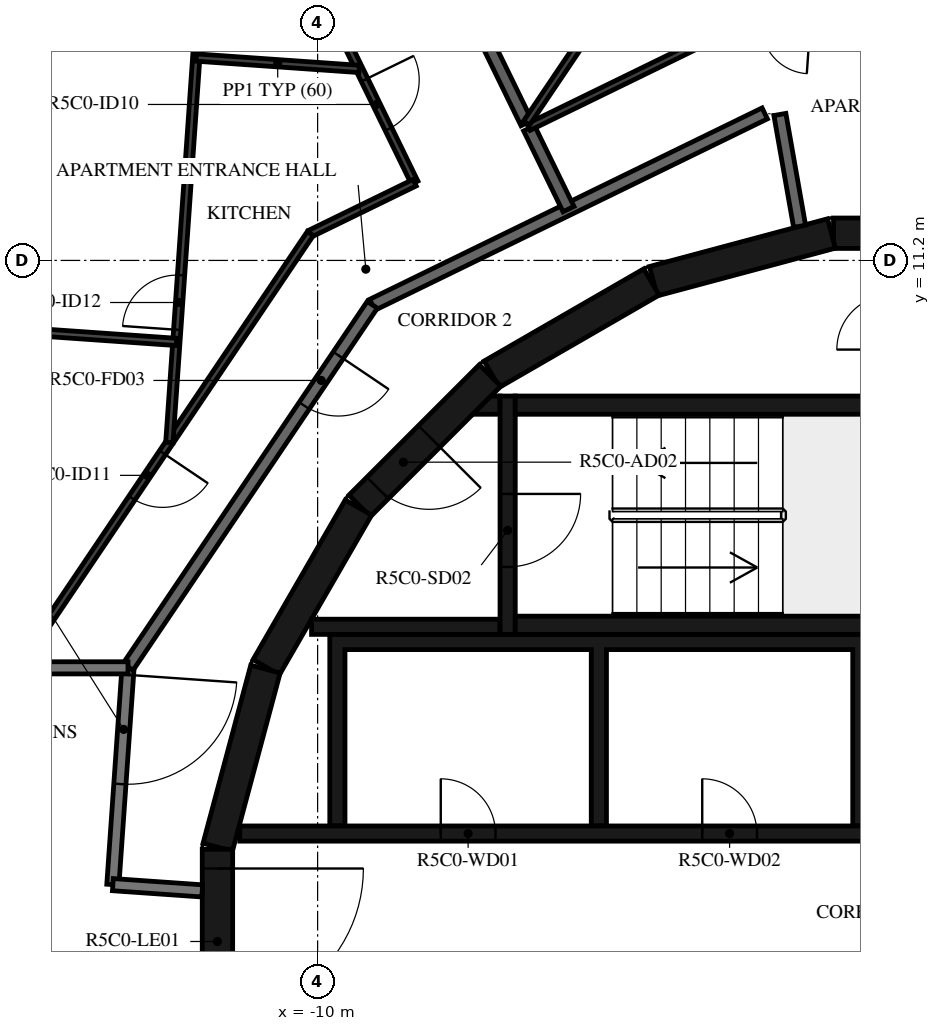
"""IFC4 building model, lengths in metres.
Left out: names, types, materials, properties, quantities, classifications, styles, units other than length and angle.
Written with IfcOpenShell. Run it as: python <this file> out.ifc"""

import sys

from ifc_helpers import new_model, si_unit, direction, frame, frame_2d, origin, place, context, subcontext, project, spatial, polyline, rectangle, outline, extrude, element, fill, save


model = new_model("IFC4")
c1 = context("Model", 3, precision=1e-05, world=origin(), true_north=direction((0.0, 1.0)))
c2 = subcontext(c1, "Body", "Model", "MODEL_VIEW")
j1 = project(units=[si_unit("LENGTHUNIT", "METRE"), si_unit("PLANEANGLEUNIT", "RADIAN")], contexts=[c1])
p1 = place(None, origin())
s1 = spatial("IfcSite", under=j1, at=p1, CompositionType="ELEMENT")
p2 = place(p1, origin())
s2 = spatial("IfcBuilding", under=s1, at=p2, CompositionType="ELEMENT")
p3 = place(p2, frame((0.0, 0.0, 209.4)))
s3 = spatial("IfcBuildingStorey", under=s2, at=p3, CompositionType="ELEMENT", Elevation=209.4)
for number, where, z_axis, x_axis in (
    (1, (1.516, 11.647, 0.0), (0.0, 0.0, 1.0), (-1.0, 0.0, 0.0)),
    (2, (-1.55, 11.643, 0.0), (0.0, 0.0, 1.0), (-0.966, -0.259, 0.0)),
    (3, (-4.51, 10.845, 0.0), (0.0, 0.0, 1.0), (-0.866, -0.5, 0.0)),
):
    element("IfcWall", number, at=place(p3, frame(where, z_axis=z_axis, x_axis=x_axis)), inside=s3, PredefinedType="SHEAR", context=c2, shape_type="SweptSolid", body=[
        extrude(rectangle(XDim=3.033, YDim=0.5, at=frame_2d((1.516, 0.0))), origin(), (0.0, 0.0, 1.0), 3.12),
    ])
p4 = place(p3, frame((-7.164, 9.308, 0.0), z_axis=(0.0, 0.0, 1.0), x_axis=(-0.707106781187, -0.707106781187, 0.0)))
e4 = element("IfcWall", 4, at=p4, inside=s3, PredefinedType="SHEAR", context=c2, shape_type="SweptSolid", body=[
    extrude(rectangle(XDim=3.032, YDim=0.5, at=frame_2d((1.516, 0.0))), origin(), (0.0, 0.0, 1.0), 3.12),
])
p5 = place(p4, frame((1.416, 0.0, 0.0)))
e5 = element("IfcOpeningElement", 5, at=p5, cuts=e4, PredefinedType="OPENING", context=c2, shape_type="SweptSolid", body=[
    extrude(rectangle(XDim=1.2, YDim=2.1, at=frame_2d((0.6, 1.05))), frame((0.0, 0.26, 0.0), z_axis=(0.0, -1.0, 0.0), x_axis=(1.0, 0.0, 0.0)), (0.0, 0.0, 1.0), 0.52),
])
for number, where, z_axis, x_axis in (
    (6, (-9.329, 7.137, 0.0), (0.0, 0.0, 1.0), (-0.5, -0.866, 0.0)),
    (7, (-10.858, 4.479, 0.0), (0.0, 0.0, 1.0), (-0.259, -0.966, 0.0)),
):
    element("IfcWall", number, at=place(p3, frame(where, z_axis=z_axis, x_axis=x_axis)), inside=s3, PredefinedType="SHEAR", context=c2, shape_type="SweptSolid", body=[
        extrude(rectangle(XDim=3.033, YDim=0.5, at=frame_2d((1.516, 0.0))), origin(), (0.0, 0.0, 1.0), 3.12),
    ])
p6 = place(p3, frame((-11.647, 1.516, 0.0), z_axis=(0.0, 0.0, 1.0), x_axis=(0.0, -1.0, 0.0)))
e8 = element("IfcWall", 8, at=p6, inside=s3, PredefinedType="SHEAR", context=c2, shape_type="SweptSolid", body=[
    extrude(rectangle(XDim=3.033, YDim=0.5, at=frame_2d((1.516, 0.0))), origin(), (0.0, 0.0, 1.0), 3.12),
])
p7 = place(p6, frame((0.316, 0.0, 0.0)))
e9 = element("IfcOpeningElement", 9, at=p7, cuts=e8, PredefinedType="OPENING", context=c2, shape_type="SweptSolid", body=[
    extrude(rectangle(XDim=2.4, YDim=2.1, at=frame_2d((1.2, 1.05))), frame((0.0, 0.26, 0.0), z_axis=(0.0, -1.0, 0.0), x_axis=(1.0, 0.0, 0.0)), (0.0, 0.0, 1.0), 0.52),
])
for number, where, z_axis, x_axis in (
    (10, (-6.75, 5.2, 0.0), (0.0, 0.0, 1.0), (1.0, 0.0, 0.0)),
    (11, (-6.75, 8.82, 0.0), (0.0, 0.0, 1.0), (1.0, 0.0, 0.0)),
):
    element("IfcWall", number, at=place(p3, frame(where, z_axis=z_axis, x_axis=x_axis)), inside=s3, PredefinedType="SHEAR", context=c2, shape_type="SweptSolid", body=[
        extrude(rectangle(XDim=6.75, YDim=0.3, at=frame_2d((3.375, 0.0))), origin(), (0.0, 0.0, 1.0), 3.12),
    ])
p8 = place(p3, frame((-6.875, 8.97, 0.0), z_axis=(0.0, 0.0, 1.0), x_axis=(0.0, -1.0, 0.0)))
e12 = element("IfcWall", 12, at=p8, inside=s3, PredefinedType="SHEAR", context=c2, shape_type="SweptSolid", body=[
    extrude(rectangle(XDim=3.92, YDim=0.25, at=frame_2d((1.96, 0.0))), origin(), (0.0, 0.0, 1.0), 3.12),
])
p9 = place(p8, frame((1.61, 0.0, 0.0)))
e13 = element("IfcOpeningElement", 13, at=p9, cuts=e12, PredefinedType="OPENING", context=c2, shape_type="SweptSolid", body=[
    extrude(rectangle(XDim=1.2, YDim=2.1, at=frame_2d((0.6, 1.05))), frame((0.0, 0.135, 0.0), z_axis=(0.0, -1.0, 0.0), x_axis=(1.0, 0.0, 0.0)), (0.0, 0.0, 1.0), 0.27),
])
p10 = place(p3, frame((-7.0, 5.175, 0.0), z_axis=(0.0, 0.0, 1.0), x_axis=(-1.0, 0.0, 0.0)))
e14 = element("IfcWall", 14, at=p10, inside=s3, PredefinedType="SHEAR", context=c2, shape_type="SweptSolid", body=[
    extrude(rectangle(XDim=3.1, YDim=0.25, at=frame_2d((1.55, 0.0))), origin(), (0.0, 0.0, 1.0), 3.12),
])
p11 = place(p3, origin())
e15 = element("IfcWall", 15, at=p11, inside=s3, PredefinedType="SHEAR", context=c2, shape_type="SweptSolid", body=[
    extrude(outline(polyline([(-7.148, 8.97), (-7.0, 8.97), (-7.0, 8.67), (-7.448, 8.67), (-7.148, 8.97)])), origin(), (0.0, 0.0, 1.0), 3.12),
])
p12 = place(p3, origin())
e16 = element("IfcWall", 16, at=p12, inside=s3, PredefinedType="SHEAR", context=c2, shape_type="SweptSolid", body=[
    extrude(outline(polyline([(-9.55, 4.8), (-5.5, 4.8), (-5.5, 1.9), (-5.25, 1.9), (-5.25, 4.8), (-1.2, 4.8), (-1.2, 1.9), (-0.95, 1.9), (-0.95, 4.8), (0.95, 4.8), (0.95, 1.9), (1.2, 1.9), (1.2, 4.8), (3.1, 4.8), (3.1, 1.9), (3.35, 1.9), (3.35, 4.8), (5.25, 4.8), (5.25, 1.9), (5.5, 1.9), (5.5, 4.8), (7.4, 4.8), (7.4, 1.9), (7.65, 1.9), (7.65, 4.8), (9.55, 4.8), (9.55, 1.9), (9.8, 1.9), (9.8, 4.8), (9.8, 5.05), (-9.8, 5.05), (-9.8, 4.8), (-9.8, 1.9), (-9.55, 1.9), (-9.55, 4.8)])), origin(), (0.0, 0.0, 1.0), 3.12),
])
p13 = place(p3, frame((-11.28, 1.775, 0.0), z_axis=(0.0, 0.0, 1.0), x_axis=(1.0, 0.0, 0.0)))
e17 = element("IfcWall", 17, at=p13, inside=s3, PredefinedType="SHEAR", context=c2, shape_type="SweptSolid", body=[
    extrude(rectangle(XDim=14.38, YDim=0.25, at=frame_2d((7.19, 0.0))), origin(), (0.0, 0.0, 1.0), 3.12),
])
p14 = place(p13, frame((10.73, 0.0, 0.0)))
e18 = element("IfcOpeningElement", 18, at=p14, cuts=e17, PredefinedType="OPENING", context=c2, shape_type="SweptSolid", body=[
    extrude(rectangle(XDim=1.1, YDim=2.1, at=frame_2d((0.55, 1.05))), frame((0.0, 0.135, 0.0), z_axis=(0.0, -1.0, 0.0), x_axis=(1.0, 0.0, 0.0)), (0.0, 0.0, 1.0), 0.27),
])
p15 = place(p13, frame((12.88, 0.0, 0.0)))
e19 = element("IfcOpeningElement", 19, at=p15, cuts=e17, PredefinedType="OPENING", context=c2, shape_type="SweptSolid", body=[
    extrude(rectangle(XDim=1.1, YDim=2.1, at=frame_2d((0.55, 1.05))), frame((0.0, 0.135, 0.0), z_axis=(0.0, -1.0, 0.0), x_axis=(1.0, 0.0, 0.0)), (0.0, 0.0, 1.0), 0.27),
])
p16 = place(p13, frame((3.305, 0.0, 0.0)))
e20 = element("IfcOpeningElement", 20, at=p16, cuts=e17, PredefinedType="OPENING", context=c2, shape_type="SweptSolid", body=[
    extrude(rectangle(XDim=0.9, YDim=2.1, at=frame_2d((0.45, 1.05))), frame((0.0, 0.135, 0.0), z_axis=(0.0, -1.0, 0.0), x_axis=(1.0, 0.0, 0.0)), (0.0, 0.0, 1.0), 0.27),
])
p17 = place(p13, frame((7.605, 0.0, 0.0)))
e21 = element("IfcOpeningElement", 21, at=p17, cuts=e17, PredefinedType="OPENING", context=c2, shape_type="SweptSolid", body=[
    extrude(rectangle(XDim=0.9, YDim=2.1, at=frame_2d((0.45, 1.05))), frame((0.0, 0.135, 0.0), z_axis=(0.0, -1.0, 0.0), x_axis=(1.0, 0.0, 0.0)), (0.0, 0.0, 1.0), 0.27),
])
p18 = place(p3, frame((-13.118, 4.5, 0.0), z_axis=(0.0, 0.0, 1.0), x_axis=(-0.069746872611, -0.99756472159, 0.0)))
e22 = element("IfcWall", 22, at=p18, inside=s3, PredefinedType="STANDARD", context=c2, shape_type="SweptSolid", body=[
    extrude(rectangle(XDim=3.574, YDim=0.2, at=frame_2d((1.787, 0.0))), origin(), (0.0, 0.0, 1.0), 3.12),
])
p19 = place(p18, frame((0.115, 0.0, 0.0)))
e23 = element("IfcOpeningElement", 23, at=p19, cuts=e22, PredefinedType="OPENING", context=c2, shape_type="SweptSolid", body=[
    extrude(rectangle(XDim=1.8, YDim=2.1, at=frame_2d((0.9, 1.05))), frame((0.0, 0.11, 0.0), z_axis=(0.0, -1.0, 0.0), x_axis=(1.0, 0.0, 0.0)), (0.0, 0.0, 1.0), 0.22),
])
p20 = place(p3, frame((-13.367, 0.935, 0.0), z_axis=(0.0, 0.0, 1.0), x_axis=(0.997553656289, -0.069904955655, 0.0)))
e24 = element("IfcWall", 24, at=p20, inside=s3, PredefinedType="STANDARD", context=c2, shape_type="SweptSolid", body=[
    extrude(rectangle(XDim=1.474, YDim=0.2, at=frame_2d((0.737, 0.0))), origin(), (0.0, 0.0, 1.0), 3.12),
])
p21 = place(p3, frame((-2.074, 11.761, 0.0), z_axis=(0.0, 0.0, 1.0), x_axis=(-0.173740587112, 0.984791454263, 0.0)))
e25 = element("IfcWall", 25, at=p21, inside=s3, PredefinedType="STANDARD", context=c2, shape_type="SweptSolid", body=[
    extrude(rectangle(XDim=1.867, YDim=0.2, at=frame_2d((0.934, 0.0))), origin(), (0.0, 0.0, 1.0), 3.12),
])
p22 = place(p3, frame((-2.647, 13.618, 0.0), z_axis=(0.0, 0.0, 1.0), x_axis=(-0.898796543751, -0.438366026218, 0.0)))
e26 = element("IfcWall", 26, at=p22, inside=s3, PredefinedType="STANDARD", context=c2, shape_type="SweptSolid", body=[
    extrude(rectangle(XDim=7.181, YDim=0.2, at=frame_2d((3.591, 0.0))), origin(), (0.0, 0.0, 1.0), 3.12),
])
p23 = place(p3, frame((-9.101, 10.47, 0.0), z_axis=(0.0, 0.0, 1.0), x_axis=(-0.559195469534, -0.829035841718, 0.0)))
e27 = element("IfcWall", 27, at=p23, inside=s3, PredefinedType="STANDARD", context=c2, shape_type="SweptSolid", body=[
    extrude(rectangle(XDim=7.181, YDim=0.2, at=frame_2d((3.591, 0.0))), origin(), (0.0, 0.0, 1.0), 3.12),
])
p24 = place(p23, frame((1.0, 0.0, 0.0)))
e28 = element("IfcOpeningElement", 28, at=p24, cuts=e27, PredefinedType="OPENING", context=c2, shape_type="SweptSolid", body=[
    extrude(rectangle(XDim=1.0, YDim=2.1, at=frame_2d((0.5, 1.05))), frame((0.0, 0.11, 0.0), z_axis=(0.0, -1.0, 0.0), x_axis=(1.0, 0.0, 0.0)), (0.0, 0.0, 1.0), 0.22),
])
p25 = place(p3, frame((-13.118, 4.5, 0.0), z_axis=(0.0, 0.0, 1.0), x_axis=(-1.0, 0.0, 0.0)))
e29 = element("IfcWall", 29, at=p25, inside=s3, PredefinedType="STANDARD", context=c2, shape_type="SweptSolid", body=[
    extrude(rectangle(XDim=4.782, YDim=0.2, at=frame_2d((2.391, 0.0))), origin(), (0.0, 0.0, 1.0), 3.12),
])
p26 = place(p3, frame((-6.522, 13.373, 0.0), z_axis=(0.0, 0.0, 1.0), x_axis=(0.438277270821, -0.8988398266, 0.0)))
e30 = element("IfcWall", 30, at=p26, inside=s3, PredefinedType="STANDARD", context=c2, shape_type="SweptSolid", body=[
    extrude(rectangle(XDim=1.479, YDim=0.2, at=frame_2d((0.74, 0.0))), origin(), (0.0, 0.0, 1.0), 3.12),
])
p27 = place(p3, frame((-8.219, 16.851, 0.0), z_axis=(0.0, 0.0, 1.0), x_axis=(0.438291091101, -0.898833087654, 0.0)))
e31 = element("IfcWall", 31, at=p27, inside=s3, PredefinedType="STANDARD", context=c2, shape_type="SweptSolid", body=[
    extrude(rectangle(XDim=3.774, YDim=0.2, at=frame_2d((1.887, 0.0))), origin(), (0.0, 0.0, 1.0), 3.12),
])
p28 = place(p3, frame((4.477, 14.623, 0.0), z_axis=(0.0, 0.0, 1.0), x_axis=(-0.997564862172, 0.069744861884, 0.0)))
e32 = element("IfcWall", 32, at=p28, inside=s3, PredefinedType="PARTITIONING", context=c2, shape_type="SweptSolid", body=[
    extrude(rectangle(XDim=7.438, YDim=0.12, at=frame_2d((3.719, 0.0))), origin(), (0.0, 0.0, 1.0), 3.12),
])
p29 = place(p28, frame((0.2, 0.0, 0.0)))
e33 = element("IfcOpeningElement", 33, at=p29, cuts=e32, PredefinedType="OPENING", context=c2, shape_type="SweptSolid", body=[
    extrude(rectangle(XDim=0.9, YDim=2.1, at=frame_2d((0.45, 1.05))), frame((0.0, 0.07, 0.0), z_axis=(0.0, -1.0, 0.0), x_axis=(1.0, 0.0, 0.0)), (0.0, 0.0, 1.0), 0.14),
])
p30 = place(p28, frame((6.392, 0.0, 0.0)))
e34 = element("IfcOpeningElement", 34, at=p30, cuts=e32, PredefinedType="OPENING", context=c2, shape_type="SweptSolid", body=[
    extrude(rectangle(XDim=0.8, YDim=2.1, at=frame_2d((0.4, 1.05))), frame((0.0, 0.07, 0.0), z_axis=(0.0, -1.0, 0.0), x_axis=(1.0, 0.0, 0.0)), (0.0, 0.0, 1.0), 0.14),
])
p31 = place(p3, frame((-2.943, 15.142, 0.0), z_axis=(0.0, 0.0, 1.0), x_axis=(-0.89881075705, -0.438336883014, 0.0)))
e35 = element("IfcWall", 35, at=p31, inside=s3, PredefinedType="PARTITIONING", context=c2, shape_type="SweptSolid", body=[
    extrude(rectangle(XDim=3.992, YDim=0.12, at=frame_2d((1.996, 0.0))), origin(), (0.0, 0.0, 1.0), 3.12),
])
p32 = place(p3, frame((-3.939, 17.35, 0.0), z_axis=(0.0, 0.0, 1.0), x_axis=(-0.559193216274, -0.829037361566, 0.0)))
e36 = element("IfcWall", 36, at=p32, inside=s3, PredefinedType="PARTITIONING", context=c2, shape_type="SweptSolid", body=[
    extrude(rectangle(XDim=4.694, YDim=0.12, at=frame_2d((2.347, 0.0))), origin(), (0.0, 0.0, 1.0), 3.12),
])
p33 = place(p3, frame((-10.5, 16.775, 0.0), z_axis=(0.0, 0.0, 1.0), x_axis=(0.438345136783, -0.898806731761, 0.0)))
e37 = element("IfcWall", 37, at=p33, inside=s3, PredefinedType="PARTITIONING", context=c2, shape_type="SweptSolid", body=[
    extrude(rectangle(XDim=4.78, YDim=0.12, at=frame_2d((2.39, 0.0))), origin(), (0.0, 0.0, 1.0), 3.12),
])
p34 = place(p33, frame((0.7, 0.0, 0.0)))
e38 = element("IfcOpeningElement", 38, at=p34, cuts=e37, PredefinedType="OPENING", context=c2, shape_type="SweptSolid", body=[
    extrude(rectangle(XDim=0.8, YDim=2.1, at=frame_2d((0.4, 1.05))), frame((0.0, 0.07, 0.0), z_axis=(0.0, -1.0, 0.0), x_axis=(1.0, 0.0, 0.0)), (0.0, 0.0, 1.0), 0.14),
])
p35 = place(p33, frame((2.899, 0.0, 0.0)))
e39 = element("IfcOpeningElement", 39, at=p35, cuts=e37, PredefinedType="OPENING", context=c2, shape_type="SweptSolid", body=[
    extrude(rectangle(XDim=0.9, YDim=2.1, at=frame_2d((0.45, 1.05))), frame((0.0, 0.07, 0.0), z_axis=(0.0, -1.0, 0.0), x_axis=(1.0, 0.0, 0.0)), (0.0, 0.0, 1.0), 0.14),
])
p36 = place(p3, frame((-8.405, 12.479, 0.0), z_axis=(0.0, 0.0, 1.0), x_axis=(-0.898784427692, -0.438390867307, 0.0)))
e40 = element("IfcWall", 40, at=p36, inside=s3, PredefinedType="PARTITIONING", context=c2, shape_type="SweptSolid", body=[
    extrude(rectangle(XDim=1.908, YDim=0.12, at=frame_2d((0.954, 0.0))), origin(), (0.0, 0.0, 1.0), 3.12),
])
p37 = place(p3, frame((-10.12, 11.642, 0.0), z_axis=(0.0, 0.0, 1.0), x_axis=(-0.55920080659, -0.829032241779, 0.0)))
e41 = element("IfcWall", 41, at=p37, inside=s3, PredefinedType="PARTITIONING", context=c2, shape_type="SweptSolid", body=[
    extrude(rectangle(XDim=7.985, YDim=0.12, at=frame_2d((3.992, 0.0))), origin(), (0.0, 0.0, 1.0), 3.12),
])
p38 = place(p37, frame((4.346, 0.0, 0.0)))
e42 = element("IfcOpeningElement", 42, at=p38, cuts=e41, PredefinedType="OPENING", context=c2, shape_type="SweptSolid", body=[
    extrude(rectangle(XDim=0.9, YDim=2.1, at=frame_2d((0.45, 1.05))), frame((0.0, 0.07, 0.0), z_axis=(0.0, -1.0, 0.0), x_axis=(1.0, 0.0, 0.0)), (0.0, 0.0, 1.0), 0.14),
])
p39 = place(p3, frame((-12.439, 8.204, 0.0), z_axis=(0.0, 0.0, 1.0), x_axis=(0.069750037523, 0.997564500303, 0.0)))
e43 = element("IfcWall", 43, at=p39, inside=s3, PredefinedType="PARTITIONING", context=c2, shape_type="SweptSolid", body=[
    extrude(rectangle(XDim=10.014, YDim=0.12, at=frame_2d((5.007, 0.0))), origin(), (0.0, 0.0, 1.0), 3.12),
])
p40 = place(p39, frame((1.859, 0.0, 0.0)))
e44 = element("IfcOpeningElement", 44, at=p40, cuts=e43, PredefinedType="OPENING", context=c2, shape_type="SweptSolid", body=[
    extrude(rectangle(XDim=0.9, YDim=2.1, at=frame_2d((0.45, 1.05))), frame((0.0, 0.07, 0.0), z_axis=(0.0, -1.0, 0.0), x_axis=(1.0, 0.0, 0.0)), (0.0, 0.0, 1.0), 0.14),
])
p41 = place(p3, frame((-11.996, 14.536, 0.0), z_axis=(0.0, 0.0, 1.0), x_axis=(0.997565991425, -0.069728708231, 0.0)))
e45 = element("IfcWall", 45, at=p41, inside=s3, PredefinedType="PARTITIONING", context=c2, shape_type="SweptSolid", body=[
    extrude(rectangle(XDim=2.686, YDim=0.12, at=frame_2d((1.343, 0.0))), origin(), (0.0, 0.0, 1.0), 3.12),
])
p42 = place(p3, frame((-17.51, 10.222, 0.0), z_axis=(0.0, 0.0, 1.0), x_axis=(0.997563184303, -0.069768856397, 0.0)))
e46 = element("IfcWall", 46, at=p42, inside=s3, PredefinedType="PARTITIONING", context=c2, shape_type="SweptSolid", body=[
    extrude(rectangle(XDim=5.2, YDim=0.12, at=frame_2d((2.6, 0.0))), origin(), (0.0, 0.0, 1.0), 2.73),
])
p43 = place(p9, origin())
e47 = element("IfcDoor", 47, at=p43, inside=s3, OperationType="SINGLE_SWING_LEFT", PredefinedType="DOOR", context=c2, shape_type="SweptSolid", body=[
    extrude(rectangle(XDim=1.2, YDim=2.1, at=frame_2d((0.6, 1.05))), frame((0.0, 0.025, 0.0), z_axis=(0.0, -1.0, 0.0), x_axis=(1.0, 0.0, 0.0)), (0.0, 0.0, 1.0), 0.05),
])
fill(e13, e47)
p44 = place(p5, origin())
e48 = element("IfcDoor", 48, at=p44, inside=s3, OperationType="SINGLE_SWING_RIGHT", PredefinedType="DOOR", context=c2, shape_type="SweptSolid", body=[
    extrude(rectangle(XDim=1.2, YDim=2.1, at=frame_2d((0.6, 1.05))), frame((0.0, 0.025, 0.0), z_axis=(0.0, -1.0, 0.0), x_axis=(1.0, 0.0, 0.0)), (0.0, 0.0, 1.0), 0.05),
])
fill(e5, e48)
p45 = place(p7, origin())
e49 = element("IfcDoor", 49, at=p45, inside=s3, OperationType="DOUBLE_DOOR_SINGLE_SWING", PredefinedType="DOOR", context=c2, shape_type="SweptSolid", body=[
    extrude(rectangle(XDim=2.4, YDim=2.1, at=frame_2d((1.2, 1.05))), frame((0.0, 0.025, 0.0), z_axis=(0.0, -1.0, 0.0), x_axis=(1.0, 0.0, 0.0)), (0.0, 0.0, 1.0), 0.05),
])
fill(e9, e49)
p46 = place(p16, origin())
e50 = element("IfcDoor", 50, at=p46, inside=s3, OperationType="SINGLE_SWING_LEFT", PredefinedType="DOOR", context=c2, shape_type="SweptSolid", body=[
    extrude(rectangle(XDim=0.9, YDim=2.1, at=frame_2d((0.45, 1.05))), frame((0.0, 0.025, 0.0), z_axis=(0.0, -1.0, 0.0), x_axis=(1.0, 0.0, 0.0)), (0.0, 0.0, 1.0), 0.05),
])
fill(e20, e50)
p47 = place(p17, origin())
e51 = element("IfcDoor", 51, at=p47, inside=s3, OperationType="SINGLE_SWING_RIGHT", PredefinedType="DOOR", context=c2, shape_type="SweptSolid", body=[
    extrude(rectangle(XDim=0.9, YDim=2.1, at=frame_2d((0.45, 1.05))), frame((0.0, 0.025, 0.0), z_axis=(0.0, -1.0, 0.0), x_axis=(1.0, 0.0, 0.0)), (0.0, 0.0, 1.0), 0.05),
])
fill(e21, e51)
p48 = place(p24, origin())
e52 = element("IfcDoor", 52, at=p48, inside=s3, OperationType="SINGLE_SWING_LEFT", PredefinedType="DOOR", context=c2, shape_type="SweptSolid", body=[
    extrude(rectangle(XDim=1.0, YDim=2.1, at=frame_2d((0.5, 1.05))), frame((0.0, 0.025, 0.0), z_axis=(0.0, -1.0, 0.0), x_axis=(1.0, 0.0, 0.0)), (0.0, 0.0, 1.0), 0.05),
])
fill(e28, e52)
p49 = place(p35, origin())
e53 = element("IfcDoor", 53, at=p49, inside=s3, OperationType="SINGLE_SWING_LEFT", PredefinedType="DOOR", context=c2, shape_type="SweptSolid", body=[
    extrude(rectangle(XDim=0.9, YDim=2.1, at=frame_2d((0.45, 1.05))), frame((0.0, 0.025, 0.0), z_axis=(0.0, -1.0, 0.0), x_axis=(1.0, 0.0, 0.0)), (0.0, 0.0, 1.0), 0.05),
])
fill(e39, e53)
p50 = place(p38, origin())
e54 = element("IfcDoor", 54, at=p50, inside=s3, OperationType="SINGLE_SWING_LEFT", PredefinedType="DOOR", context=c2, shape_type="SweptSolid", body=[
    extrude(rectangle(XDim=0.9, YDim=2.1, at=frame_2d((0.45, 1.05))), frame((0.0, 0.025, 0.0), z_axis=(0.0, -1.0, 0.0), x_axis=(1.0, 0.0, 0.0)), (0.0, 0.0, 1.0), 0.05),
])
fill(e42, e54)
p51 = place(p40, origin())
e55 = element("IfcDoor", 55, at=p51, inside=s3, OperationType="SINGLE_SWING_LEFT", PredefinedType="DOOR", context=c2, shape_type="SweptSolid", body=[
    extrude(rectangle(XDim=0.9, YDim=2.1, at=frame_2d((0.45, 1.05))), frame((0.0, 0.025, 0.0), z_axis=(0.0, -1.0, 0.0), x_axis=(1.0, 0.0, 0.0)), (0.0, 0.0, 1.0), 0.05),
])
fill(e44, e55)
p52 = place(p19, origin())
e56 = element("IfcDoor", 56, at=p52, inside=s3, OperationType="DOUBLE_DOOR_SINGLE_SWING", PredefinedType="DOOR", context=c2, shape_type="SweptSolid", body=[
    extrude(rectangle(XDim=1.8, YDim=2.1, at=frame_2d((0.9, 1.05))), frame((0.0, 0.025, 0.0), z_axis=(0.0, -1.0, 0.0), x_axis=(1.0, 0.0, 0.0)), (0.0, 0.0, 1.0), 0.05),
])
fill(e23, e56)
save(model, sys.argv[1])
